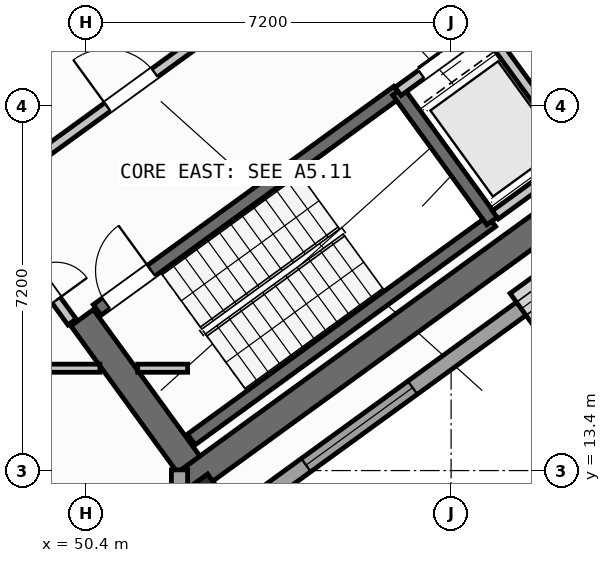
"""IFC4 building model, lengths in metres.
Left out: names, types, materials, properties, quantities, classifications, styles, units other than length and angle.
Written with IfcOpenShell. Run it as: python <this file> out.ifc"""

import sys

from ifc_helpers import new_model, si_unit, direction, frame, frame_2d, origin, origin_2d, place, context, subcontext, project, spatial, rectangle, hollow_rectangle, extrude, source, transform, mapped, element, fill, save


model = new_model("IFC4")
c1 = context("Model", 3, precision=1e-05, world=origin(), true_north=direction((0.0, 1.0)))
c2 = subcontext(c1, "Body", "Model", "MODEL_VIEW")
j1 = project(units=[si_unit("LENGTHUNIT", "METRE"), si_unit("PLANEANGLEUNIT", "RADIAN")], contexts=[c1])
p1 = place(None, origin())
s1 = spatial("IfcSite", under=j1, at=p1, CompositionType="ELEMENT")
p2 = place(p1, origin())
s2 = spatial("IfcBuilding", under=s1, at=p2, CompositionType="ELEMENT")
p3 = place(p2, frame((0.0, 0.0, 195.0)))
s3 = spatial("IfcBuildingStorey", under=s2, at=p3, CompositionType="ELEMENT", Elevation=195.0)
p4 = place(p3, frame((52.359, 13.14, 0.0), z_axis=(0.0, 0.0, 1.0), x_axis=(0.809014896919, 0.587788139183, 0.0)))
e1 = element("IfcWall", 1, at=p4, inside=s3, PredefinedType="SHEAR", context=c2, shape_type="SweptSolid", body=[
    extrude(rectangle(XDim=12.34, YDim=0.55, at=frame_2d((6.17, 0.0))), origin(), (0.0, 0.0, 1.0), 4.22),
])
p5 = place(p3, frame((52.42, 13.524, 0.0), z_axis=(0.0, 0.0, 1.0), x_axis=(-0.587802113096, 0.809004744015, 0.0)))
e2 = element("IfcWall", 2, at=p5, inside=s3, PredefinedType="SHEAR", context=c2, shape_type="SweptSolid", body=[
    extrude(rectangle(XDim=3.575, YDim=0.55, at=frame_2d((1.788, 0.0))), origin(), (0.0, 0.0, 1.0), 4.22),
])
m1 = source(origin(), c2, "Body", "SweptSolid", [
    extrude(hollow_rectangle(XDim=0.8, YDim=0.8, WallThickness=0.032, at=origin_2d()), origin(), (0.0, 0.0, 1.0), 4.5),
])
p6 = place(p3, frame((52.705, 12.773, 0.0), z_axis=(0.0, 0.0, 1.0), x_axis=(0.809016994375, 0.587785252292, 0.0)))
e3 = element("IfcColumn", 3, at=p6, inside=s3, PredefinedType="COLUMN", context=c2, shape_type="MappedRepresentation", body=[
    mapped(m1, transform((0.0, 0.0, 0.0), scale=1.0)),
])
p7 = place(p3, frame((67.454, 22.747, 0.0), z_axis=(0.0, 0.0, 1.0), x_axis=(-0.809021120468, -0.587779573171, 0.0)))
e4 = element("IfcWall", 4, at=p7, inside=s3, PredefinedType="STANDARD", context=c2, shape_type="SweptSolid", body=[
    extrude(rectangle(XDim=17.588, YDim=0.32, at=frame_2d((8.794, 0.0))), origin(), (0.0, 0.0, 1.0), 4.22),
])
p8 = place(p7, frame((1.624, 0.0, 0.0)))
e5 = element("IfcOpeningElement", 5, at=p8, cuts=e4, PredefinedType="OPENING", context=c2, shape_type="SweptSolid", body=[
    extrude(rectangle(XDim=1.05, YDim=2.15, at=frame_2d((0.525, 1.075))), frame((0.0, 0.17, 0.0), z_axis=(0.0, -1.0, 0.0), x_axis=(1.0, 0.0, 0.0)), (0.0, 0.0, 1.0), 0.34),
])
p9 = place(p7, frame((7.869, 0.0, 0.7)))
e6 = element("IfcOpeningElement", 6, at=p9, cuts=e4, PredefinedType="OPENING", context=c2, shape_type="SweptSolid", body=[
    extrude(rectangle(XDim=2.6, YDim=2.0, at=frame_2d((1.3, 1.0))), frame((0.0, 0.17, 0.0), z_axis=(0.0, -1.0, 0.0), x_axis=(1.0, 0.0, 0.0)), (0.0, 0.0, 1.0), 0.34),
])
p10 = place(p7, frame((13.119, 0.0, 0.7)))
e7 = element("IfcOpeningElement", 7, at=p10, cuts=e4, PredefinedType="OPENING", context=c2, shape_type="SweptSolid", body=[
    extrude(rectangle(XDim=2.6, YDim=2.0, at=frame_2d((1.3, 1.0))), frame((0.0, 0.17, 0.0), z_axis=(0.0, -1.0, 0.0), x_axis=(1.0, 0.0, 0.0)), (0.0, 0.0, 1.0), 0.34),
])
p11 = place(p3, frame((52.24, 13.414, 0.0), z_axis=(0.0, 0.0, 1.0), x_axis=(0.0, -1.0, 0.0)))
e8 = element("IfcWall", 8, at=p11, inside=s3, PredefinedType="STANDARD", context=c2, shape_type="SweptSolid", body=[
    extrude(rectangle(XDim=9.948, YDim=0.32, at=frame_2d((4.974, 0.0))), origin(), (0.0, 0.0, 1.0), 4.22),
])
p12 = place(p11, frame((2.167, 0.0, 0.7)))
e9 = element("IfcOpeningElement", 9, at=p12, cuts=e8, PredefinedType="OPENING", context=c2, shape_type="SweptSolid", body=[
    extrude(rectangle(XDim=2.6, YDim=2.0, at=frame_2d((1.3, 1.0))), frame((0.0, 0.17, 0.0), z_axis=(0.0, -1.0, 0.0), x_axis=(1.0, 0.0, 0.0)), (0.0, 0.0, 1.0), 0.34),
])
p13 = place(p11, frame((7.083, 0.0, 0.75)))
e10 = element("IfcOpeningElement", 10, at=p13, cuts=e8, PredefinedType="OPENING", context=c2, shape_type="SweptSolid", body=[
    extrude(rectangle(XDim=2.0, YDim=1.95, at=frame_2d((1.0, 0.975))), frame((0.0, 0.17, 0.0), z_axis=(0.0, -1.0, 0.0), x_axis=(1.0, 0.0, 0.0)), (0.0, 0.0, 1.0), 0.34),
])
p14 = place(p3, frame((52.472, 14.013, 0.0), z_axis=(0.0, 0.0, 1.0), x_axis=(0.809028366311, 0.587769599847, 0.0)))
e11 = element("IfcWall", 11, at=p14, inside=s3, PredefinedType="SHEAR", context=c2, shape_type="SweptSolid", body=[
    extrude(rectangle(XDim=7.33, YDim=0.26, at=frame_2d((3.665, 0.0))), origin(), (0.0, 0.0, 1.0), 4.22),
])
p15 = place(p3, frame((50.615, 16.57, 0.0), z_axis=(0.0, 0.0, 1.0), x_axis=(0.809028366311, 0.587769599847, 0.0)))
e12 = element("IfcWall", 12, at=p15, inside=s3, PredefinedType="SHEAR", context=c2, shape_type="SweptSolid", body=[
    extrude(rectangle(XDim=7.33, YDim=0.26, at=frame_2d((3.665, 0.0))), origin(), (0.0, 0.0, 1.0), 4.22),
])
p16 = place(p15, frame((0.22, 0.0, 0.0)))
e13 = element("IfcOpeningElement", 13, at=p16, cuts=e12, PredefinedType="OPENING", context=c2, shape_type="SweptSolid", body=[
    extrude(rectangle(XDim=1.1, YDim=2.1, at=frame_2d((0.55, 1.05))), frame((0.0, 0.14, 0.0), z_axis=(0.0, -1.0, 0.0), x_axis=(1.0, 0.0, 0.0)), (0.0, 0.0, 1.0), 0.28),
])
p17 = place(p3, frame((58.41, 18.327, 0.0), z_axis=(0.0, 0.0, 1.0), x_axis=(-0.58776738483, 0.809029975545, 0.0)))
e14 = element("IfcWall", 14, at=p17, inside=s3, PredefinedType="SHEAR", context=c2, shape_type="SweptSolid", body=[
    extrude(rectangle(XDim=3.16, YDim=0.26, at=frame_2d((1.58, 0.0))), origin(), (0.0, 0.0, 1.0), 4.22),
])
p18 = place(p3, frame((47.065, 21.407, 0.0), z_axis=(0.0, 0.0, 1.0), x_axis=(0.809032984992, 0.587763242466, 0.0)))
e15 = element("IfcWall", 15, at=p18, inside=s3, PredefinedType="STANDARD", context=c2, shape_type="SweptSolid", body=[
    extrude(rectangle(XDim=3.448, YDim=0.2, at=frame_2d((1.724, 0.0))), origin(), (0.0, 0.0, 1.0), 4.21),
])
p19 = place(p18, frame((0.458, 0.0, 0.0)))
e16 = element("IfcOpeningElement", 16, at=p19, cuts=e15, PredefinedType="OPENING", context=c2, shape_type="SweptSolid", body=[
    extrude(rectangle(XDim=1.3, YDim=2.2, at=frame_2d((0.65, 1.1))), frame((0.0, 0.11, 0.0), z_axis=(0.0, -1.0, 0.0), x_axis=(1.0, 0.0, 0.0)), (0.0, 0.0, 1.0), 0.22),
])
p20 = place(p3, frame((48.758, 19.077, 0.0), z_axis=(0.0, 0.0, 1.0), x_axis=(0.809005065155, 0.587801671104, 0.0)))
e17 = element("IfcWall", 17, at=p20, inside=s3, PredefinedType="STANDARD", context=c2, shape_type="SweptSolid", body=[
    extrude(rectangle(XDim=5.768, YDim=0.2, at=frame_2d((2.884, 0.0))), origin(), (0.0, 0.0, 1.0), 4.21),
])
p21 = place(p20, frame((2.548, 0.0, 0.0)))
e18 = element("IfcOpeningElement", 18, at=p21, cuts=e17, PredefinedType="OPENING", context=c2, shape_type="SweptSolid", body=[
    extrude(rectangle(XDim=1.15, YDim=2.1, at=frame_2d((0.575, 1.05))), frame((0.0, 0.11, 0.0), z_axis=(0.0, -1.0, 0.0), x_axis=(1.0, 0.0, 0.0)), (0.0, 0.0, 1.0), 0.22),
])
p22 = place(p3, frame((56.553, 20.884, 0.0), z_axis=(0.0, 0.0, 1.0), x_axis=(0.809023564264, 0.58777620951, 0.0)))
e19 = element("IfcWall", 19, at=p22, inside=s3, PredefinedType="STANDARD", context=c2, shape_type="SweptSolid", body=[
    extrude(rectangle(XDim=3.818, YDim=0.2, at=frame_2d((1.909, 0.0))), origin(), (0.0, 0.0, 1.0), 4.21),
])
p23 = place(p22, frame((0.57, 0.0, 0.0)))
e20 = element("IfcOpeningElement", 20, at=p23, cuts=e19, PredefinedType="OPENING", context=c2, shape_type="SweptSolid", body=[
    extrude(rectangle(XDim=1.1, YDim=2.15, at=frame_2d((0.55, 1.075))), frame((0.0, 0.11, 0.0), z_axis=(0.0, -1.0, 0.0), x_axis=(1.0, 0.0, 0.0)), (0.0, 0.0, 1.0), 0.22),
])
p24 = place(p22, frame((2.65, 0.0, 0.0)))
e21 = element("IfcOpeningElement", 21, at=p24, cuts=e19, PredefinedType="OPENING", context=c2, shape_type="SweptSolid", body=[
    extrude(rectangle(XDim=0.86, YDim=2.05, at=frame_2d((0.43, 1.025))), frame((0.0, 0.11, 0.0), z_axis=(0.0, -1.0, 0.0), x_axis=(1.0, 0.0, 0.0)), (0.0, 0.0, 1.0), 0.22),
])
p25 = place(p3, frame((60.067, 19.655, 0.0), z_axis=(0.0, 0.0, 1.0), x_axis=(-0.587800520745, 0.809005900975, 0.0)))
e22 = element("IfcWall", 22, at=p25, inside=s3, PredefinedType="STANDARD", context=c2, shape_type="SweptSolid", body=[
    extrude(rectangle(XDim=2.66, YDim=0.2, at=frame_2d((1.33, 0.0))), origin(), (0.0, 0.0, 1.0), 4.21),
])
p26 = place(p3, frame((58.472, 18.447, 0.0), z_axis=(0.0, 0.0, 1.0), x_axis=(0.809018631237, 0.587782999339, 0.0)))
e23 = element("IfcWall", 23, at=p26, inside=s3, PredefinedType="STANDARD", context=c2, shape_type="SweptSolid", body=[
    extrude(rectangle(XDim=3.698, YDim=0.2, at=frame_2d((1.849, 0.0))), origin(), (0.0, 0.0, 1.0), 4.21),
])
p27 = place(p3, frame((35.237, 15.42, 0.0), z_axis=(0.0, 0.0, 1.0), x_axis=(1.0, 0.0, 0.0)))
e24 = element("IfcWall", 24, at=p27, inside=s3, PredefinedType="PARTITIONING", context=c2, shape_type="SweptSolid", body=[
    extrude(rectangle(XDim=15.432, YDim=0.16, at=frame_2d((7.716, 0.0))), origin(), (0.0, 0.0, 1.0), 4.21),
])
p28 = place(p27, frame((0.674, 0.0, 0.0)))
e25 = element("IfcOpeningElement", 25, at=p28, cuts=e24, PredefinedType="OPENING", context=c2, shape_type="SweptSolid", body=[
    extrude(rectangle(XDim=1.0, YDim=2.1, at=frame_2d((0.5, 1.05))), frame((0.0, 0.09, 0.0), z_axis=(0.0, -1.0, 0.0), x_axis=(1.0, 0.0, 0.0)), (0.0, 0.0, 1.0), 0.18),
])
p29 = place(p27, frame((9.094, 0.0, 0.0)))
e26 = element("IfcOpeningElement", 26, at=p29, cuts=e24, PredefinedType="OPENING", context=c2, shape_type="SweptSolid", body=[
    extrude(rectangle(XDim=1.0, YDim=2.1, at=frame_2d((0.5, 1.05))), frame((0.0, 0.09, 0.0), z_axis=(0.0, -1.0, 0.0), x_axis=(1.0, 0.0, 0.0)), (0.0, 0.0, 1.0), 0.18),
])
p30 = place(p3, frame((51.416, 15.42, 0.0), z_axis=(0.0, 0.0, 1.0), x_axis=(1.0, 0.0, 0.0)))
e27 = element("IfcWall", 27, at=p30, inside=s3, PredefinedType="PARTITIONING", context=c2, shape_type="SweptSolid", body=[
    extrude(rectangle(XDim=0.984, YDim=0.16, at=frame_2d((0.492, 0.0))), origin(), (0.0, 0.0, 1.0), 4.21),
])
p31 = place(p3, frame((50.119, 16.333, 0.0), z_axis=(0.0, 0.0, 1.0), x_axis=(-0.587749856981, 0.809042709391, 0.0)))
e28 = element("IfcWall", 28, at=p31, inside=s3, PredefinedType="STANDARD", context=c2, shape_type="SweptSolid", body=[
    extrude(rectangle(XDim=2.96, YDim=0.2, at=frame_2d((1.48, 0.0))), origin(), (0.0, 0.0, 1.0), 4.21),
])
p32 = place(p31, frame((0.53, 0.0, 0.0)))
e29 = element("IfcOpeningElement", 29, at=p32, cuts=e28, PredefinedType="OPENING", context=c2, shape_type="SweptSolid", body=[
    extrude(rectangle(XDim=1.5, YDim=2.15, at=frame_2d((0.75, 1.075))), frame((0.0, 0.11, 0.0), z_axis=(0.0, -1.0, 0.0), x_axis=(1.0, 0.0, 0.0)), (0.0, 0.0, 1.0), 0.22),
])
p33 = place(p3, frame((64.709, 20.938, 0.0), z_axis=(0.0, 0.0, 1.0), x_axis=(-0.58777828151, 0.809022058899, 0.0)))
e30 = element("IfcWall", 30, at=p33, inside=s3, PredefinedType="PARTITIONING", context=c2, shape_type="SweptSolid", body=[
    extrude(rectangle(XDim=21.7, YDim=0.16, at=frame_2d((10.85, 0.0))), origin(), (0.0, 0.0, 1.0), 4.21),
])
p34 = place(p33, frame((5.12, 0.0, 0.0)))
e31 = element("IfcOpeningElement", 31, at=p34, cuts=e30, PredefinedType="OPENING", context=c2, shape_type="SweptSolid", body=[
    extrude(rectangle(XDim=1.7, YDim=2.2, at=frame_2d((0.85, 1.1))), frame((0.0, 0.09, 0.0), z_axis=(0.0, -1.0, 0.0), x_axis=(1.0, 0.0, 0.0)), (0.0, 0.0, 1.0), 0.18),
])
m2 = source(origin(), c2, "Body", "SweptSolid", [
    extrude(rectangle(XDim=2.6, YDim=2.0, at=frame_2d((1.3, 1.0))), frame((0.0, 0.03, 0.0), z_axis=(0.0, -1.0, 0.0), x_axis=(1.0, 0.0, 0.0)), (0.0, 0.0, 1.0), 0.06),
])
p35 = place(p9, origin())
e32 = element("IfcWindow", 32, at=p35, inside=s3, PartitioningType="SINGLE_PANEL", PredefinedType="WINDOW", context=c2, shape_type="MappedRepresentation", body=[
    mapped(m2, transform((0.0, 0.0, 0.0), scale=1.0)),
])
fill(e6, e32)
p36 = place(p10, origin())
e33 = element("IfcWindow", 33, at=p36, inside=s3, PartitioningType="SINGLE_PANEL", PredefinedType="WINDOW", context=c2, shape_type="MappedRepresentation", body=[
    mapped(m2, transform((0.0, 0.0, 0.0), scale=1.0)),
])
fill(e7, e33)
m3 = source(origin(), c2, "Body", "SweptSolid", [
    extrude(rectangle(XDim=1.1, YDim=2.1, at=frame_2d((0.55, 1.05))), frame((0.0, 0.025, 0.0), z_axis=(0.0, -1.0, 0.0), x_axis=(1.0, 0.0, 0.0)), (0.0, 0.0, 1.0), 0.05),
])
p37 = place(p16, origin())
e34 = element("IfcDoor", 34, at=p37, inside=s3, OperationType="SINGLE_SWING_RIGHT", PredefinedType="DOOR", context=c2, shape_type="MappedRepresentation", body=[
    mapped(m3, transform((0.0, 0.0, 0.0), scale=1.0)),
])
fill(e13, e34)
m4 = source(origin(), c2, "Body", "SweptSolid", [
    extrude(rectangle(XDim=1.15, YDim=2.1, at=frame_2d((0.575, 1.05))), frame((0.0, 0.025, 0.0), z_axis=(0.0, -1.0, 0.0), x_axis=(1.0, 0.0, 0.0)), (0.0, 0.0, 1.0), 0.05),
])
p38 = place(p21, origin())
e35 = element("IfcDoor", 35, at=p38, inside=s3, OperationType="SINGLE_SWING_LEFT", PredefinedType="DOOR", context=c2, shape_type="MappedRepresentation", body=[
    mapped(m4, transform((0.0, 0.0, 0.0), scale=1.0)),
])
fill(e18, e35)
m5 = source(origin(), c2, "Body", "SweptSolid", [
    extrude(rectangle(XDim=1.1, YDim=2.15, at=frame_2d((0.55, 1.075))), frame((0.0, 0.025, 0.0), z_axis=(0.0, -1.0, 0.0), x_axis=(1.0, 0.0, 0.0)), (0.0, 0.0, 1.0), 0.05),
])
p39 = place(p23, origin())
e36 = element("IfcDoor", 36, at=p39, inside=s3, OperationType="DOUBLE_DOOR_SLIDING", PredefinedType="DOOR", context=c2, shape_type="MappedRepresentation", body=[
    mapped(m5, transform((0.0, 0.0, 0.0), scale=1.0)),
])
fill(e20, e36)
m6 = source(origin(), c2, "Body", "SweptSolid", [
    extrude(rectangle(XDim=1.5, YDim=2.15, at=frame_2d((0.75, 1.075))), frame((0.0, 0.025, 0.0), z_axis=(0.0, -1.0, 0.0), x_axis=(1.0, 0.0, 0.0)), (0.0, 0.0, 1.0), 0.05),
])
p40 = place(p32, frame((1.5, 0.0, 0.0), z_axis=(0.0, 0.0, 1.0), x_axis=(-1.0, 0.0, 0.0)))
e37 = element("IfcDoor", 37, at=p40, inside=s3, OperationType="DOUBLE_DOOR_SINGLE_SWING", PredefinedType="DOOR", context=c2, shape_type="MappedRepresentation", body=[
    mapped(m6, transform((0.0, 0.0, 0.0), scale=1.0)),
])
fill(e29, e37)
save(model, sys.argv[1])
